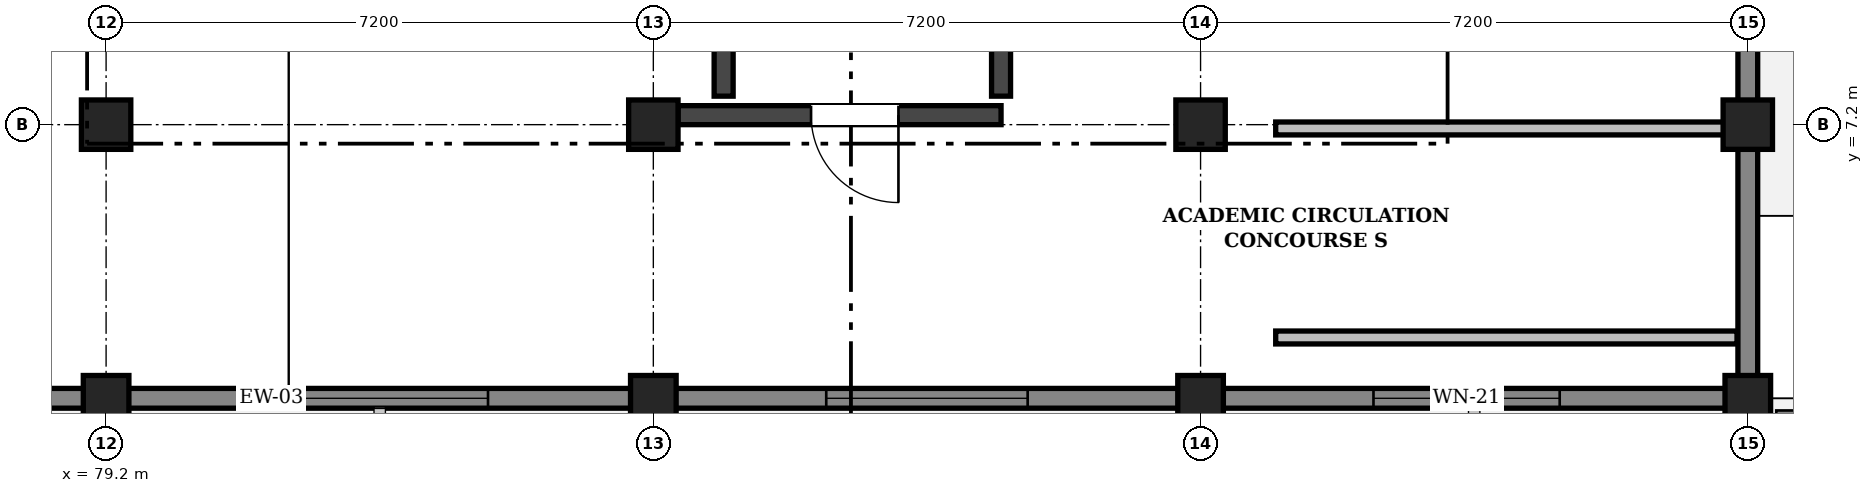
"""IFC4 building model, lengths in metres.
Left out: names, types, materials, properties, quantities, classifications, styles, units other than length and angle.
Written with IfcOpenShell. Run it as: python <this file> out.ifc"""

import sys

from ifc_helpers import new_model, si_unit, direction, frame, frame_2d, origin, origin_2d, place, context, subcontext, project, spatial, rectangle, extrude, element, fill, save


model = new_model("IFC4")
c1 = context("Model", 3, precision=1e-05, world=origin(), true_north=direction((0.0, 1.0)))
c2 = subcontext(c1, "Body", "Model", "MODEL_VIEW")
j1 = project(units=[si_unit("LENGTHUNIT", "METRE"), si_unit("PLANEANGLEUNIT", "RADIAN")], contexts=[c1])
p1 = place(None, origin())
s1 = spatial("IfcSite", under=j1, at=p1, CompositionType="ELEMENT")
p2 = place(p1, origin())
s2 = spatial("IfcBuilding", under=s1, at=p2, CompositionType="ELEMENT")
p3 = place(p2, frame((0.0, 0.0, 23.4)))
s3 = spatial("IfcBuildingStorey", under=s2, at=p3, CompositionType="ELEMENT", Elevation=23.4)
p4 = place(p3, frame((79.2, 3.6, 0.0), z_axis=(0.0, 0.0, 1.0), x_axis=(1.0, 0.0, 0.0)))
e1 = element("IfcColumn", 1, at=p4, inside=s3, PredefinedType="COLUMN", context=c2, shape_type="SweptSolid", body=[
    extrude(rectangle(XDim=0.6, YDim=0.6, at=origin_2d()), origin(), (0.0, 0.0, 1.0), 4.5),
])
p5 = place(p3, frame((79.2, 7.2, 0.0), z_axis=(0.0, 0.0, 1.0), x_axis=(1.0, 0.0, 0.0)))
e2 = element("IfcColumn", 2, at=p5, inside=s3, PredefinedType="COLUMN", context=c2, shape_type="SweptSolid", body=[
    extrude(rectangle(XDim=0.65, YDim=0.65, at=origin_2d()), origin(), (0.0, 0.0, 1.0), 4.5),
])
p6 = place(p3, frame((86.4, 3.6, 0.0), z_axis=(0.0, 0.0, 1.0), x_axis=(1.0, 0.0, 0.0)))
e3 = element("IfcColumn", 3, at=p6, inside=s3, PredefinedType="COLUMN", context=c2, shape_type="SweptSolid", body=[
    extrude(rectangle(XDim=0.6, YDim=0.6, at=origin_2d()), origin(), (0.0, 0.0, 1.0), 4.5),
])
p7 = place(p3, frame((86.4, 7.2, 0.0), z_axis=(0.0, 0.0, 1.0), x_axis=(1.0, 0.0, 0.0)))
e4 = element("IfcColumn", 4, at=p7, inside=s3, PredefinedType="COLUMN", context=c2, shape_type="SweptSolid", body=[
    extrude(rectangle(XDim=0.65, YDim=0.65, at=origin_2d()), origin(), (0.0, 0.0, 1.0), 4.5),
])
p8 = place(p3, frame((93.6, 3.6, 0.0), z_axis=(0.0, 0.0, 1.0), x_axis=(1.0, 0.0, 0.0)))
e5 = element("IfcColumn", 5, at=p8, inside=s3, PredefinedType="COLUMN", context=c2, shape_type="SweptSolid", body=[
    extrude(rectangle(XDim=0.6, YDim=0.6, at=origin_2d()), origin(), (0.0, 0.0, 1.0), 4.5),
])
p9 = place(p3, frame((93.6, 7.2, 0.0), z_axis=(0.0, 0.0, 1.0), x_axis=(1.0, 0.0, 0.0)))
e6 = element("IfcColumn", 6, at=p9, inside=s3, PredefinedType="COLUMN", context=c2, shape_type="SweptSolid", body=[
    extrude(rectangle(XDim=0.65, YDim=0.65, at=origin_2d()), origin(), (0.0, 0.0, 1.0), 4.5),
])
p10 = place(p3, frame((100.8, 3.6, 0.0), z_axis=(0.0, 0.0, 1.0), x_axis=(1.0, 0.0, 0.0)))
e7 = element("IfcColumn", 7, at=p10, inside=s3, PredefinedType="COLUMN", context=c2, shape_type="SweptSolid", body=[
    extrude(rectangle(XDim=0.6, YDim=0.6, at=origin_2d()), origin(), (0.0, 0.0, 1.0), 4.5),
])
p11 = place(p3, frame((100.8, 7.2, 0.0), z_axis=(0.0, 0.0, 1.0), x_axis=(1.0, 0.0, 0.0)))
e8 = element("IfcColumn", 8, at=p11, inside=s3, PredefinedType="COLUMN", context=c2, shape_type="SweptSolid", body=[
    extrude(rectangle(XDim=0.65, YDim=0.65, at=origin_2d()), origin(), (0.0, 0.0, 1.0), 4.5),
])
p12 = place(p3, frame((100.95, 3.6, 0.0), z_axis=(0.0, 0.0, 1.0), x_axis=(-1.0, 0.0, 0.0)))
e9 = element("IfcWall", 9, at=p12, inside=s3, PredefinedType="SOLIDWALL", context=c2, shape_type="SweptSolid", body=[
    extrude(rectangle(XDim=7.35, YDim=0.26, at=frame_2d((3.675, 0.0))), origin(), (0.0, 0.0, 1.0), 4.22),
])
p13 = place(p12, frame((2.625, 0.0, 0.95)))
e10 = element("IfcOpeningElement", 10, at=p13, cuts=e9, PredefinedType="OPENING", context=c2, shape_type="SweptSolid", body=[
    extrude(rectangle(XDim=2.45, YDim=1.55, at=frame_2d((1.225, 0.775))), frame((0.0, 0.142, 0.0), z_axis=(0.0, -1.0, 0.0), x_axis=(1.0, 0.0, 0.0)), (0.0, 0.0, 1.0), 0.284),
])
p14 = place(p3, frame((93.6, 3.6, 0.0), z_axis=(0.0, 0.0, 1.0), x_axis=(-1.0, 0.0, 0.0)))
e11 = element("IfcWall", 11, at=p14, inside=s3, PredefinedType="SOLIDWALL", context=c2, shape_type="SweptSolid", body=[
    extrude(rectangle(XDim=7.2, YDim=0.26, at=frame_2d((3.6, 0.0))), origin(), (0.0, 0.0, 1.0), 4.22),
])
p15 = place(p14, frame((2.275, 0.0, 0.95)))
e12 = element("IfcOpeningElement", 12, at=p15, cuts=e11, PredefinedType="OPENING", context=c2, shape_type="SweptSolid", body=[
    extrude(rectangle(XDim=2.65, YDim=1.55, at=frame_2d((1.325, 0.775))), frame((0.0, 0.142, 0.0), z_axis=(0.0, -1.0, 0.0), x_axis=(1.0, 0.0, 0.0)), (0.0, 0.0, 1.0), 0.284),
])
p16 = place(p3, frame((86.4, 3.6, 0.0), z_axis=(0.0, 0.0, 1.0), x_axis=(-1.0, 0.0, 0.0)))
e13 = element("IfcWall", 13, at=p16, inside=s3, PredefinedType="SOLIDWALL", context=c2, shape_type="SweptSolid", body=[
    extrude(rectangle(XDim=7.2, YDim=0.26, at=frame_2d((3.6, 0.0))), origin(), (0.0, 0.0, 1.0), 4.22),
])
p17 = place(p16, frame((2.175, 0.0, 0.95)))
e14 = element("IfcOpeningElement", 14, at=p17, cuts=e13, PredefinedType="OPENING", context=c2, shape_type="SweptSolid", body=[
    extrude(rectangle(XDim=2.85, YDim=1.55, at=frame_2d((1.425, 0.775))), frame((0.0, 0.142, 0.0), z_axis=(0.0, -1.0, 0.0), x_axis=(1.0, 0.0, 0.0)), (0.0, 0.0, 1.0), 0.284),
])
p18 = place(p3, frame((79.2, 3.6, 0.0), z_axis=(0.0, 0.0, 1.0), x_axis=(-1.0, 0.0, 0.0)))
e15 = element("IfcWall", 15, at=p18, inside=s3, PredefinedType="SOLIDWALL", context=c2, shape_type="SweptSolid", body=[
    extrude(rectangle(XDim=7.2, YDim=0.26, at=frame_2d((3.6, 0.0))), origin(), (0.0, 0.0, 1.0), 4.22),
])
p19 = place(p18, frame((2.05, 0.0, 0.95)))
e16 = element("IfcOpeningElement", 16, at=p19, cuts=e15, PredefinedType="OPENING", context=c2, shape_type="SweptSolid", body=[
    extrude(rectangle(XDim=3.1, YDim=1.55, at=frame_2d((1.55, 0.775))), frame((0.0, 0.142, 0.0), z_axis=(0.0, -1.0, 0.0), x_axis=(1.0, 0.0, 0.0)), (0.0, 0.0, 1.0), 0.284),
])
p20 = place(p3, frame((100.8, 14.4, 0.0), z_axis=(0.0, 0.0, 1.0), x_axis=(0.0, -1.0, 0.0)))
e17 = element("IfcWall", 17, at=p20, inside=s3, PredefinedType="SOLIDWALL", context=c2, shape_type="SweptSolid", body=[
    extrude(rectangle(XDim=7.2, YDim=0.26, at=frame_2d((3.6, 0.0))), origin(), (0.0, 0.0, 1.0), 4.22),
])
p21 = place(p20, frame((2.35, 0.0, 0.95)))
e18 = element("IfcOpeningElement", 18, at=p21, cuts=e17, PredefinedType="OPENING", context=c2, shape_type="SweptSolid", body=[
    extrude(rectangle(XDim=2.5, YDim=1.3, at=frame_2d((1.25, 0.65))), frame((0.0, 0.142, 0.0), z_axis=(0.0, -1.0, 0.0), x_axis=(1.0, 0.0, 0.0)), (0.0, 0.0, 1.0), 0.284),
])
p22 = place(p3, frame((100.8, 7.2, 0.0), z_axis=(0.0, 0.0, 1.0), x_axis=(0.0, -1.0, 0.0)))
e19 = element("IfcWall", 19, at=p22, inside=s3, PredefinedType="SOLIDWALL", context=c2, shape_type="SweptSolid", body=[
    extrude(rectangle(XDim=3.448, YDim=0.26, at=frame_2d((1.724, 0.0))), origin(), (0.0, 0.0, 1.0), 4.22),
])
p23 = place(p3, frame((101.174, 3.35, 0.0), z_axis=(0.0, 0.0, 1.0), x_axis=(1.0, 0.0, 0.0)))
e20 = element("IfcWall", 20, at=p23, inside=s3, PredefinedType="PARAPET", context=c2, shape_type="SweptSolid", body=[
    extrude(rectangle(XDim=10.276, YDim=0.18, at=frame_2d((5.138, 0.0))), origin(), (0.0, 0.0, 1.0), 0.95),
])
p24 = place(p3, frame((86.725, 7.325, 0.0), z_axis=(0.0, 0.0, 1.0), x_axis=(1.0, 0.0, 0.0)))
e21 = element("IfcWall", 21, at=p24, inside=s3, PredefinedType="SHEAR", context=c2, shape_type="SweptSolid", body=[
    extrude(rectangle(XDim=4.25, YDim=0.25, at=frame_2d((2.125, 0.0))), origin(), (0.0, 0.0, 1.0), 4.25),
])
p25 = place(p24, frame((1.75, 0.0, 0.0)))
e22 = element("IfcOpeningElement", 22, at=p25, cuts=e21, PredefinedType="OPENING", context=c2, shape_type="SweptSolid", body=[
    extrude(rectangle(XDim=1.15, YDim=2.15, at=frame_2d((0.575, 1.075))), frame((0.0, 0.137, 0.0), z_axis=(0.0, -1.0, 0.0), x_axis=(1.0, 0.0, 0.0)), (0.0, 0.0, 1.0), 0.274),
])
p26 = place(p3, frame((87.325, 7.575, 0.0), z_axis=(0.0, 0.0, 1.0), x_axis=(0.0, 1.0, 0.0)))
e23 = element("IfcWall", 23, at=p26, inside=s3, PredefinedType="SHEAR", context=c2, shape_type="SweptSolid", body=[
    extrude(rectangle(XDim=2.77, YDim=0.25, at=frame_2d((1.385, 0.0))), origin(), (0.0, 0.0, 1.0), 4.25),
])
p27 = place(p3, frame((90.975, 7.575, 0.0), z_axis=(0.0, 0.0, 1.0), x_axis=(0.0, 1.0, 0.0)))
e24 = element("IfcWall", 24, at=p27, inside=s3, PredefinedType="SHEAR", context=c2, shape_type="SweptSolid", body=[
    extrude(rectangle(XDim=3.225, YDim=0.25, at=frame_2d((1.613, 0.0))), origin(), (0.0, 0.0, 1.0), 4.25),
])
p28 = place(p3, frame((94.588, 4.4, 0.0), z_axis=(0.0, 0.0, 1.0), x_axis=(1.0, 0.0, 0.0)))
e25 = element("IfcWall", 25, at=p28, inside=s3, PredefinedType="PARTITIONING", context=c2, shape_type="SweptSolid", body=[
    extrude(rectangle(XDim=6.07, YDim=0.17, at=frame_2d((3.035, 0.0))), origin(), (0.0, 0.0, 1.0), 4.16),
])
p29 = place(p3, frame((94.588, 7.15, 0.0), z_axis=(0.0, 0.0, 1.0), x_axis=(1.0, 0.0, 0.0)))
e26 = element("IfcWall", 26, at=p29, inside=s3, PredefinedType="PARTITIONING", context=c2, shape_type="SweptSolid", body=[
    extrude(rectangle(XDim=6.07, YDim=0.17, at=frame_2d((3.035, 0.0))), origin(), (0.0, 0.0, 1.0), 3.73),
])
p30 = place(p13, origin())
e27 = element("IfcWindow", 27, at=p30, inside=s3, PartitioningType="SINGLE_PANEL", PredefinedType="WINDOW", context=c2, shape_type="SweptSolid", body=[
    extrude(rectangle(XDim=2.45, YDim=1.55, at=frame_2d((1.225, 0.775))), frame((0.0, 0.03, 0.0), z_axis=(0.0, -1.0, 0.0), x_axis=(1.0, 0.0, 0.0)), (0.0, 0.0, 1.0), 0.06),
])
fill(e10, e27)
p31 = place(p15, origin())
e28 = element("IfcWindow", 28, at=p31, inside=s3, PartitioningType="SINGLE_PANEL", PredefinedType="WINDOW", context=c2, shape_type="SweptSolid", body=[
    extrude(rectangle(XDim=2.65, YDim=1.55, at=frame_2d((1.325, 0.775))), frame((0.0, 0.03, 0.0), z_axis=(0.0, -1.0, 0.0), x_axis=(1.0, 0.0, 0.0)), (0.0, 0.0, 1.0), 0.06),
])
fill(e12, e28)
p32 = place(p17, origin())
e29 = element("IfcWindow", 29, at=p32, inside=s3, PartitioningType="SINGLE_PANEL", PredefinedType="WINDOW", context=c2, shape_type="SweptSolid", body=[
    extrude(rectangle(XDim=2.85, YDim=1.55, at=frame_2d((1.425, 0.775))), frame((0.0, 0.03, 0.0), z_axis=(0.0, -1.0, 0.0), x_axis=(1.0, 0.0, 0.0)), (0.0, 0.0, 1.0), 0.06),
])
fill(e14, e29)
p33 = place(p25, frame((1.15, 0.0, 0.0), z_axis=(0.0, 0.0, 1.0), x_axis=(-1.0, 0.0, 0.0)))
e30 = element("IfcDoor", 30, at=p33, inside=s3, OperationType="SINGLE_SWING_LEFT", PredefinedType="DOOR", context=c2, shape_type="SweptSolid", body=[
    extrude(rectangle(XDim=1.15, YDim=2.15, at=frame_2d((0.575, 1.075))), frame((0.0, 0.025, 0.0), z_axis=(0.0, -1.0, 0.0), x_axis=(1.0, 0.0, 0.0)), (0.0, 0.0, 1.0), 0.05),
])
fill(e22, e30)
save(model, sys.argv[1])
